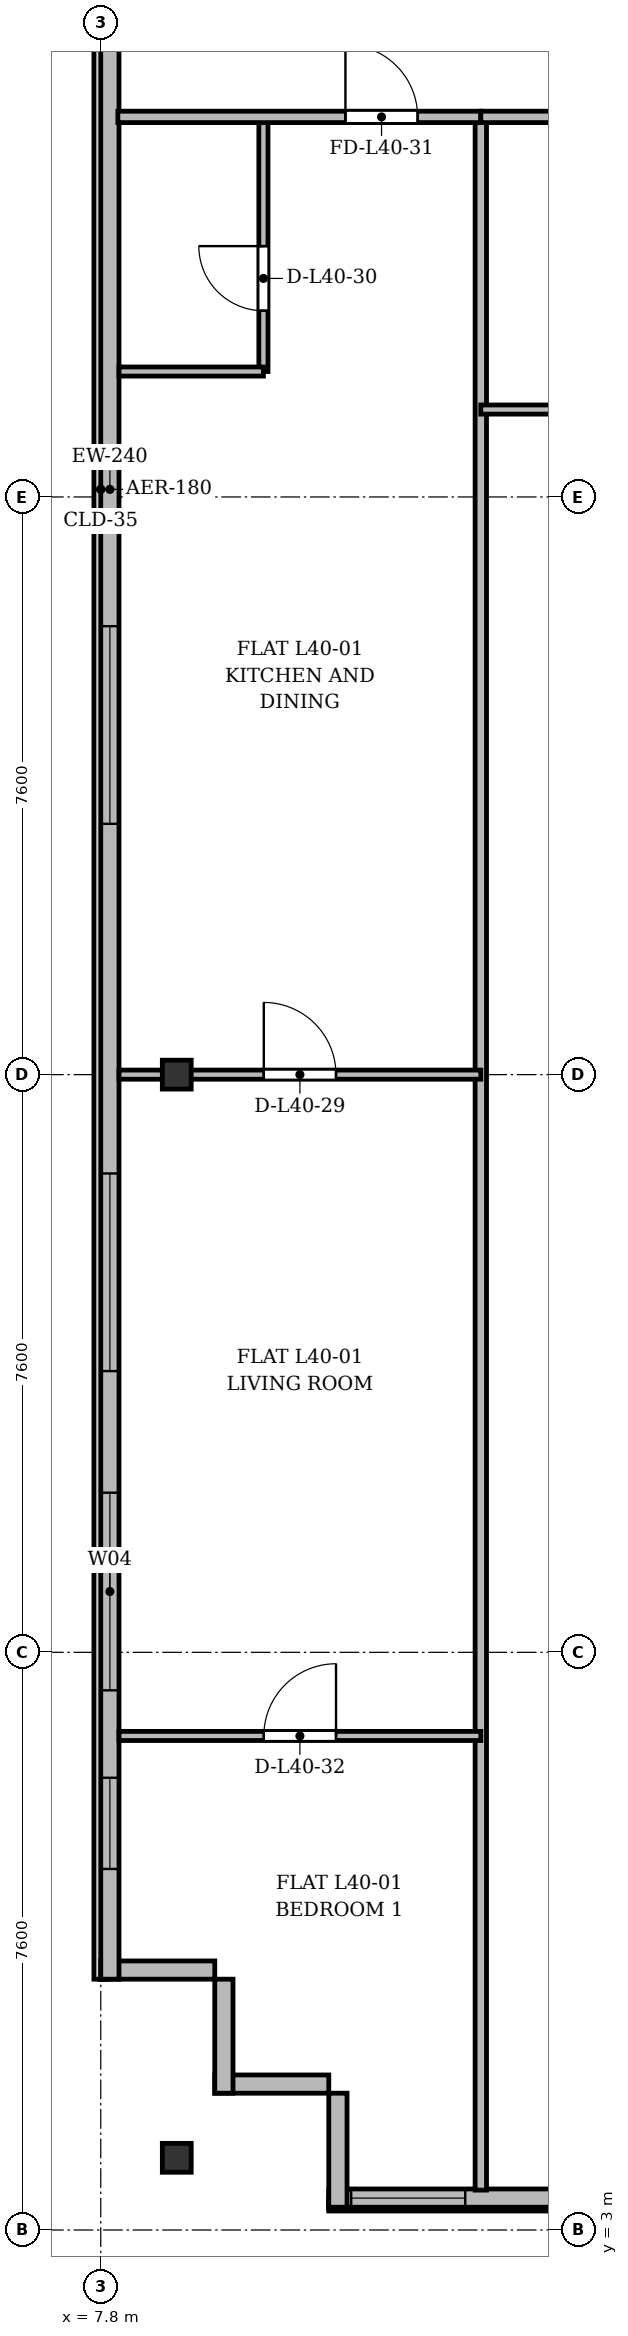
"""IFC4 building model, lengths in metres.
Left out: names, types, materials, properties, quantities, classifications, styles, units other than length and angle.
Written with IfcOpenShell. Run it as: python <this file> out.ifc"""

import sys

from ifc_helpers import new_model, si_unit, direction, frame, frame_2d, origin, origin_2d, place, context, subcontext, project, spatial, rectangle, i_section, extrude, source, transform, mapped, element, fill, save


model = new_model("IFC4")
c1 = context("Model", 3, precision=1e-05, world=origin(), true_north=direction((0.0, 1.0)))
c2 = subcontext(c1, "Body", "Model", "MODEL_VIEW")
j1 = project(units=[si_unit("LENGTHUNIT", "METRE"), si_unit("PLANEANGLEUNIT", "RADIAN")], contexts=[c1])
p1 = place(None, origin())
s1 = spatial("IfcSite", under=j1, at=p1, CompositionType="ELEMENT")
p2 = place(p1, origin())
s2 = spatial("IfcBuilding", under=s1, at=p2, CompositionType="ELEMENT")
p3 = place(p2, frame((0.0, 0.0, 153.7)))
s3 = spatial("IfcBuildingStorey", under=s2, at=p3, CompositionType="ELEMENT", Elevation=153.7)
m1 = source(origin(), c2, "Body", "SweptSolid", [
    extrude(i_section(OverallWidth=0.38, OverallDepth=0.38, WebThickness=0.02, FlangeThickness=0.03, at=origin_2d()), origin(), (0.0, 0.0, 1.0), 3.6),
])
for number, where, z_axis, x_axis in (
    (1, (8.8, 3.95, 0.0), (0.0, 0.0, 1.0), (1.0, 0.0, 0.0)),
    (2, (8.8, 18.2, 0.0), (0.0, 0.0, 1.0), (1.0, 0.0, 0.0)),
):
    element("IfcColumn", number, at=place(p3, frame(where, z_axis=z_axis, x_axis=x_axis)), inside=s3, PredefinedType="COLUMN", context=c2, shape_type="MappedRepresentation", body=[
        mapped(m1, transform((0.0, 0.0, 0.0), x_axis=(1.0, 0.0, 0.0), y_axis=(0.0, 1.0, 0.0), z_axis=(0.0, 0.0, 1.0), scale=1.0)),
    ])
for number, where, z_axis, x_axis in (
    (3, (10.8, 4.92, 0.0), (0.0, 0.0, 1.0), (-1.0, 0.0, 0.0)),
    (4, (9.42, 4.8, 0.0), (0.0, 0.0, 1.0), (0.0, 1.0, 0.0)),
):
    element("IfcWall", number, at=place(p3, frame(where, z_axis=z_axis, x_axis=x_axis)), inside=s3, PredefinedType="SOLIDWALL", context=c2, shape_type="SweptSolid", body=[
        extrude(rectangle(XDim=1.5, YDim=0.24, at=frame_2d((0.75, 0.0))), origin(), (0.0, 0.0, 1.0), 3.35),
    ])
p4 = place(p3, frame((9.3, 6.42, 0.0), z_axis=(0.0, 0.0, 1.0), x_axis=(-1.0, 0.0, 0.0)))
e5 = element("IfcWall", 5, at=p4, inside=s3, PredefinedType="SOLIDWALL", context=c2, shape_type="SweptSolid", body=[
    extrude(rectangle(XDim=1.5, YDim=0.24, at=frame_2d((0.75, 0.0))), origin(), (0.0, 0.0, 1.0), 2.85),
])
p5 = place(p3, frame((7.92, 6.3, 0.0), z_axis=(0.0, 0.0, 1.0), x_axis=(0.0, 1.0, 0.0)))
e6 = element("IfcWall", 6, at=p5, inside=s3, PredefinedType="SOLIDWALL", context=c2, shape_type="SweptSolid", body=[
    extrude(rectangle(XDim=39.2, YDim=0.24, at=frame_2d((19.6, 0.0))), origin(), (0.0, 0.0, 1.0), 3.35),
])
p6 = place(p5, frame((1.45, 0.0, 0.92)))
e7 = element("IfcOpeningElement", 7, at=p6, cuts=e6, PredefinedType="OPENING", context=c2, shape_type="SweptSolid", body=[
    extrude(rectangle(XDim=1.2, YDim=1.65, at=frame_2d((0.6, 0.825))), frame((0.0, 0.13, 0.0), z_axis=(0.0, -1.0, 0.0), x_axis=(1.0, 0.0, 0.0)), (0.0, 0.0, 1.0), 0.26),
])
p7 = place(p5, frame((3.8, 0.0, 0.92)))
e8 = element("IfcOpeningElement", 8, at=p7, cuts=e6, PredefinedType="OPENING", context=c2, shape_type="SweptSolid", body=[
    extrude(rectangle(XDim=2.6, YDim=1.9, at=frame_2d((1.3, 0.95))), frame((0.0, 0.13, 0.0), z_axis=(0.0, -1.0, 0.0), x_axis=(1.0, 0.0, 0.0)), (0.0, 0.0, 1.0), 0.26),
])
p8 = place(p5, frame((8.0, 0.0, 0.92)))
e9 = element("IfcOpeningElement", 9, at=p8, cuts=e6, PredefinedType="OPENING", context=c2, shape_type="SweptSolid", body=[
    extrude(rectangle(XDim=2.6, YDim=1.9, at=frame_2d((1.3, 0.95))), frame((0.0, 0.13, 0.0), z_axis=(0.0, -1.0, 0.0), x_axis=(1.0, 0.0, 0.0)), (0.0, 0.0, 1.0), 0.26),
])
p9 = place(p5, frame((15.2, 0.0, 0.92)))
e10 = element("IfcOpeningElement", 10, at=p9, cuts=e6, PredefinedType="OPENING", context=c2, shape_type="SweptSolid", body=[
    extrude(rectangle(XDim=2.6, YDim=1.9, at=frame_2d((1.3, 0.95))), frame((0.0, 0.13, 0.0), z_axis=(0.0, -1.0, 0.0), x_axis=(1.0, 0.0, 0.0)), (0.0, 0.0, 1.0), 0.26),
])
p10 = place(p5, frame((29.2, 0.0, 0.92)))
e11 = element("IfcOpeningElement", 11, at=p10, cuts=e6, PredefinedType="OPENING", context=c2, shape_type="SweptSolid", body=[
    extrude(rectangle(XDim=2.6, YDim=1.9, at=frame_2d((1.3, 0.95))), frame((0.0, 0.13, 0.0), z_axis=(0.0, -1.0, 0.0), x_axis=(1.0, 0.0, 0.0)), (0.0, 0.0, 1.0), 0.26),
])
p11 = place(p5, frame((33.5, 0.0, 0.92)))
e12 = element("IfcOpeningElement", 12, at=p11, cuts=e6, PredefinedType="OPENING", context=c2, shape_type="SweptSolid", body=[
    extrude(rectangle(XDim=1.2, YDim=1.65, at=frame_2d((0.6, 0.825))), frame((0.0, 0.13, 0.0), z_axis=(0.0, -1.0, 0.0), x_axis=(1.0, 0.0, 0.0)), (0.0, 0.0, 1.0), 0.26),
])
p12 = place(p5, frame((36.85, 0.0, 0.92)))
e13 = element("IfcOpeningElement", 13, at=p12, cuts=e6, PredefinedType="OPENING", context=c2, shape_type="SweptSolid", body=[
    extrude(rectangle(XDim=1.2, YDim=1.65, at=frame_2d((0.6, 0.825))), frame((0.0, 0.13, 0.0), z_axis=(0.0, -1.0, 0.0), x_axis=(1.0, 0.0, 0.0)), (0.0, 0.0, 1.0), 0.26),
])
p13 = place(p3, frame((63.6, 3.42, 0.0), z_axis=(0.0, 0.0, 1.0), x_axis=(-1.0, 0.0, 0.0)))
e14 = element("IfcWall", 14, at=p13, inside=s3, PredefinedType="SOLIDWALL", context=c2, shape_type="SweptSolid", body=[
    extrude(rectangle(XDim=52.8, YDim=0.24, at=frame_2d((26.4, 0.0))), origin(), (0.0, 0.0, 1.0), 3.35),
])
p14 = place(p13, frame((0.295, 0.0, 0.9)))
e15 = element("IfcOpeningElement", 15, at=p14, cuts=e14, PredefinedType="OPENING", context=c2, shape_type="SweptSolid", body=[
    extrude(rectangle(XDim=1.5, YDim=1.75, at=frame_2d((0.75, 0.875))), frame((0.0, 0.13, 0.0), z_axis=(0.0, -1.0, 0.0), x_axis=(1.0, 0.0, 0.0)), (0.0, 0.0, 1.0), 0.26),
])
p15 = place(p13, frame((3.6, 0.0, 0.9)))
e16 = element("IfcOpeningElement", 16, at=p15, cuts=e14, PredefinedType="OPENING", context=c2, shape_type="SweptSolid", body=[
    extrude(rectangle(XDim=2.2, YDim=1.8, at=frame_2d((1.1, 0.9))), frame((0.0, 0.13, 0.0), z_axis=(0.0, -1.0, 0.0), x_axis=(1.0, 0.0, 0.0)), (0.0, 0.0, 1.0), 0.26),
])
p16 = place(p13, frame((7.635, 0.0, 0.0)))
e17 = element("IfcOpeningElement", 17, at=p16, cuts=e14, PredefinedType="OPENING", context=c2, shape_type="SweptSolid", body=[
    extrude(rectangle(XDim=1.2, YDim=2.2, at=frame_2d((0.6, 1.1))), frame((0.0, 0.13, 0.0), z_axis=(0.0, -1.0, 0.0), x_axis=(1.0, 0.0, 0.0)), (0.0, 0.0, 1.0), 0.26),
])
p17 = place(p13, frame((9.6, 0.0, 0.9)))
e18 = element("IfcOpeningElement", 18, at=p17, cuts=e14, PredefinedType="OPENING", context=c2, shape_type="SweptSolid", body=[
    extrude(rectangle(XDim=2.0, YDim=1.95, at=frame_2d((1.0, 0.975))), frame((0.0, 0.13, 0.0), z_axis=(0.0, -1.0, 0.0), x_axis=(1.0, 0.0, 0.0)), (0.0, 0.0, 1.0), 0.26),
])
p18 = place(p13, frame((12.175, 0.0, 0.9)))
e19 = element("IfcOpeningElement", 19, at=p18, cuts=e14, PredefinedType="OPENING", context=c2, shape_type="SweptSolid", body=[
    extrude(rectangle(XDim=1.65, YDim=1.85, at=frame_2d((0.825, 0.925))), frame((0.0, 0.13, 0.0), z_axis=(0.0, -1.0, 0.0), x_axis=(1.0, 0.0, 0.0)), (0.0, 0.0, 1.0), 0.26),
])
p19 = place(p13, frame((16.1, 0.0, 0.9)))
e20 = element("IfcOpeningElement", 20, at=p19, cuts=e14, PredefinedType="OPENING", context=c2, shape_type="SweptSolid", body=[
    extrude(rectangle(XDim=1.8, YDim=1.8, at=frame_2d((0.9, 0.9))), frame((0.0, 0.13, 0.0), z_axis=(0.0, -1.0, 0.0), x_axis=(1.0, 0.0, 0.0)), (0.0, 0.0, 1.0), 0.26),
])
p20 = place(p13, frame((22.3, 0.0, 0.9)))
e21 = element("IfcOpeningElement", 21, at=p20, cuts=e14, PredefinedType="OPENING", context=c2, shape_type="SweptSolid", body=[
    extrude(rectangle(XDim=2.2, YDim=1.8, at=frame_2d((1.1, 0.9))), frame((0.0, 0.13, 0.0), z_axis=(0.0, -1.0, 0.0), x_axis=(1.0, 0.0, 0.0)), (0.0, 0.0, 1.0), 0.26),
])
p21 = place(p13, frame((27.75, 0.0, 0.9)))
e22 = element("IfcOpeningElement", 22, at=p21, cuts=e14, PredefinedType="OPENING", context=c2, shape_type="SweptSolid", body=[
    extrude(rectangle(XDim=1.5, YDim=1.75, at=frame_2d((0.75, 0.875))), frame((0.0, 0.13, 0.0), z_axis=(0.0, -1.0, 0.0), x_axis=(1.0, 0.0, 0.0)), (0.0, 0.0, 1.0), 0.26),
])
p22 = place(p13, frame((30.5, 0.0, 0.9)))
e23 = element("IfcOpeningElement", 23, at=p22, cuts=e14, PredefinedType="OPENING", context=c2, shape_type="SweptSolid", body=[
    extrude(rectangle(XDim=2.0, YDim=1.95, at=frame_2d((1.0, 0.975))), frame((0.0, 0.13, 0.0), z_axis=(0.0, -1.0, 0.0), x_axis=(1.0, 0.0, 0.0)), (0.0, 0.0, 1.0), 0.26),
])
p23 = place(p13, frame((34.375, 0.0, 0.9)))
e24 = element("IfcOpeningElement", 24, at=p23, cuts=e14, PredefinedType="OPENING", context=c2, shape_type="SweptSolid", body=[
    extrude(rectangle(XDim=1.65, YDim=1.85, at=frame_2d((0.825, 0.925))), frame((0.0, 0.13, 0.0), z_axis=(0.0, -1.0, 0.0), x_axis=(1.0, 0.0, 0.0)), (0.0, 0.0, 1.0), 0.26),
])
p24 = place(p13, frame((39.5, 0.0, 0.9)))
e25 = element("IfcOpeningElement", 25, at=p24, cuts=e14, PredefinedType="OPENING", context=c2, shape_type="SweptSolid", body=[
    extrude(rectangle(XDim=1.8, YDim=1.8, at=frame_2d((0.9, 0.9))), frame((0.0, 0.13, 0.0), z_axis=(0.0, -1.0, 0.0), x_axis=(1.0, 0.0, 0.0)), (0.0, 0.0, 1.0), 0.26),
])
p25 = place(p13, frame((43.65, 0.0, 0.9)))
e26 = element("IfcOpeningElement", 26, at=p25, cuts=e14, PredefinedType="OPENING", context=c2, shape_type="SweptSolid", body=[
    extrude(rectangle(XDim=1.5, YDim=1.75, at=frame_2d((0.75, 0.875))), frame((0.0, 0.13, 0.0), z_axis=(0.0, -1.0, 0.0), x_axis=(1.0, 0.0, 0.0)), (0.0, 0.0, 1.0), 0.26),
])
p26 = place(p13, frame((47.35, 0.0, 0.9)))
e27 = element("IfcOpeningElement", 27, at=p26, cuts=e14, PredefinedType="OPENING", context=c2, shape_type="SweptSolid", body=[
    extrude(rectangle(XDim=1.5, YDim=1.75, at=frame_2d((0.75, 0.875))), frame((0.0, 0.13, 0.0), z_axis=(0.0, -1.0, 0.0), x_axis=(1.0, 0.0, 0.0)), (0.0, 0.0, 1.0), 0.26),
])
p27 = place(p13, frame((51.005, 0.0, 0.9)))
e28 = element("IfcOpeningElement", 28, at=p27, cuts=e14, PredefinedType="OPENING", context=c2, shape_type="SweptSolid", body=[
    extrude(rectangle(XDim=1.5, YDim=1.75, at=frame_2d((0.75, 0.875))), frame((0.0, 0.13, 0.0), z_axis=(0.0, -1.0, 0.0), x_axis=(1.0, 0.0, 0.0)), (0.0, 0.0, 1.0), 0.26),
])
p28 = place(p13, frame((37.85, 0.0, 0.0)))
e29 = element("IfcOpeningElement", 29, at=p28, cuts=e14, PredefinedType="OPENING", context=c2, shape_type="SweptSolid", body=[
    extrude(rectangle(XDim=1.2, YDim=2.2, at=frame_2d((0.6, 1.1))), frame((0.0, 0.13, 0.0), z_axis=(0.0, -1.0, 0.0), x_axis=(1.0, 0.0, 0.0)), (0.0, 0.0, 1.0), 0.26),
])
p29 = place(p3, frame((10.92, 3.3, 0.0), z_axis=(0.0, 0.0, 1.0), x_axis=(0.0, 1.0, 0.0)))
e30 = element("IfcWall", 30, at=p29, inside=s3, PredefinedType="SOLIDWALL", context=c2, shape_type="SweptSolid", body=[
    extrude(rectangle(XDim=1.5, YDim=0.24, at=frame_2d((0.75, 0.0))), origin(), (0.0, 0.0, 1.0), 2.75),
])
p30 = place(p3, frame((12.8, 3.525, 0.0), z_axis=(0.0, 0.0, 1.0), x_axis=(0.0, 1.0, 0.0)))
e31 = element("IfcWall", 31, at=p30, inside=s3, PredefinedType="PARTITIONING", context=c2, shape_type="SweptSolid", body=[
    extrude(rectangle(XDim=27.275, YDim=0.15, at=frame_2d((13.638, 0.0))), origin(), (0.0, 0.0, 1.0), 2.75),
])
p31 = place(p3, frame((8.04, 18.2, 0.0), z_axis=(0.0, 0.0, 1.0), x_axis=(1.0, 0.0, 0.0)))
e32 = element("IfcWall", 32, at=p31, inside=s3, PredefinedType="PARTITIONING", context=c2, shape_type="SweptSolid", body=[
    extrude(rectangle(XDim=4.76, YDim=0.12, at=frame_2d((2.38, 0.0))), origin(), (0.0, 0.0, 1.0), 2.75),
])
p32 = place(p31, frame((1.905, 0.0, 0.0)))
e33 = element("IfcOpeningElement", 33, at=p32, cuts=e32, PredefinedType="OPENING", context=c2, shape_type="SweptSolid", body=[
    extrude(rectangle(XDim=0.95, YDim=2.15, at=frame_2d((0.475, 1.075))), frame((0.0, 0.07, 0.0), z_axis=(0.0, -1.0, 0.0), x_axis=(1.0, 0.0, 0.0)), (0.0, 0.0, 1.0), 0.14),
])
p33 = place(p3, frame((9.94, 27.45, 0.0), z_axis=(0.0, 0.0, 1.0), x_axis=(0.0, 1.0, 0.0)))
e34 = element("IfcWall", 34, at=p33, inside=s3, PredefinedType="PARTITIONING", context=c2, shape_type="SweptSolid", body=[
    extrude(rectangle(XDim=3.35, YDim=0.12, at=frame_2d((1.675, 0.0))), origin(), (0.0, 0.0, 1.0), 3.35),
])
p34 = place(p33, frame((0.8, 0.0, 0.0)))
e35 = element("IfcOpeningElement", 35, at=p34, cuts=e34, PredefinedType="OPENING", context=c2, shape_type="SweptSolid", body=[
    extrude(rectangle(XDim=0.85, YDim=2.1, at=frame_2d((0.425, 1.05))), frame((0.0, 0.07, 0.0), z_axis=(0.0, -1.0, 0.0), x_axis=(1.0, 0.0, 0.0)), (0.0, 0.0, 1.0), 0.14),
])
p35 = place(p3, frame((8.04, 27.45, 0.0), z_axis=(0.0, 0.0, 1.0), x_axis=(1.0, 0.0, 0.0)))
e36 = element("IfcWall", 36, at=p35, inside=s3, PredefinedType="PARTITIONING", context=c2, shape_type="SweptSolid", body=[
    extrude(rectangle(XDim=1.9, YDim=0.12, at=frame_2d((0.95, 0.0))), origin(), (0.0, 0.0, 1.0), 2.85),
])
p36 = place(p3, frame((8.025, 30.8, 0.0), z_axis=(0.0, 0.0, 1.0), x_axis=(1.0, 0.0, 0.0)))
e37 = element("IfcWall", 37, at=p36, inside=s3, PredefinedType="PARTITIONING", context=c2, shape_type="SweptSolid", body=[
    extrude(rectangle(XDim=4.775, YDim=0.15, at=frame_2d((2.388, 0.0))), origin(), (0.0, 0.0, 1.0), 2.85),
])
p37 = place(p36, frame((2.994, 0.0, 0.0)))
e38 = element("IfcOpeningElement", 38, at=p37, cuts=e37, PredefinedType="OPENING", context=c2, shape_type="SweptSolid", body=[
    extrude(rectangle(XDim=0.95, YDim=2.15, at=frame_2d((0.475, 1.075))), frame((0.0, 0.085, 0.0), z_axis=(0.0, -1.0, 0.0), x_axis=(1.0, 0.0, 0.0)), (0.0, 0.0, 1.0), 0.17),
])
p38 = place(p3, frame((8.04, 9.5, 0.0), z_axis=(0.0, 0.0, 1.0), x_axis=(1.0, 0.0, 0.0)))
e39 = element("IfcWall", 39, at=p38, inside=s3, PredefinedType="PARTITIONING", context=c2, shape_type="SweptSolid", body=[
    extrude(rectangle(XDim=4.76, YDim=0.12, at=frame_2d((2.38, 0.0))), origin(), (0.0, 0.0, 1.0), 2.85),
])
p39 = place(p38, frame((1.905, 0.0, 0.0)))
e40 = element("IfcOpeningElement", 40, at=p39, cuts=e39, PredefinedType="OPENING", context=c2, shape_type="SweptSolid", body=[
    extrude(rectangle(XDim=0.95, YDim=2.15, at=frame_2d((0.475, 1.075))), frame((0.0, 0.07, 0.0), z_axis=(0.0, -1.0, 0.0), x_axis=(1.0, 0.0, 0.0)), (0.0, 0.0, 1.0), 0.14),
])
p40 = place(p3, frame((12.8, 30.8, 0.0), z_axis=(0.0, 0.0, 1.0), x_axis=(1.0, 0.0, 0.0)))
e41 = element("IfcWall", 41, at=p40, inside=s3, PredefinedType="PARTITIONING", context=c2, shape_type="SweptSolid", body=[
    extrude(rectangle(XDim=5.4, YDim=0.15, at=frame_2d((2.7, 0.0))), origin(), (0.0, 0.0, 1.0), 2.85),
])
p41 = place(p40, frame((2.225, 0.0, 0.0)))
e42 = element("IfcOpeningElement", 42, at=p41, cuts=e41, PredefinedType="OPENING", context=c2, shape_type="SweptSolid", body=[
    extrude(rectangle(XDim=0.95, YDim=2.15, at=frame_2d((0.475, 1.075))), frame((0.0, 0.085, 0.0), z_axis=(0.0, -1.0, 0.0), x_axis=(1.0, 0.0, 0.0)), (0.0, 0.0, 1.0), 0.17),
])
p42 = place(p3, frame((12.8, 26.95, 0.0), z_axis=(0.0, 0.0, 1.0), x_axis=(1.0, 0.0, 0.0)))
e43 = element("IfcWall", 43, at=p42, inside=s3, PredefinedType="PARTITIONING", context=c2, shape_type="SweptSolid", body=[
    extrude(rectangle(XDim=5.4, YDim=0.12, at=frame_2d((2.7, 0.0))), origin(), (0.0, 0.0, 1.0), 2.85),
])
p43 = place(p42, frame((2.225, 0.0, 0.0)))
e44 = element("IfcOpeningElement", 44, at=p43, cuts=e43, PredefinedType="OPENING", context=c2, shape_type="SweptSolid", body=[
    extrude(rectangle(XDim=0.95, YDim=2.15, at=frame_2d((0.475, 1.075))), frame((0.0, 0.07, 0.0), z_axis=(0.0, -1.0, 0.0), x_axis=(1.0, 0.0, 0.0)), (0.0, 0.0, 1.0), 0.14),
])
m2 = source(origin(), c2, "Body", "SweptSolid", [
    extrude(rectangle(XDim=1.2, YDim=1.65, at=frame_2d((0.6, 0.825))), frame((0.0, 0.03, 0.0), z_axis=(0.0, -1.0, 0.0), x_axis=(1.0, 0.0, 0.0)), (0.0, 0.0, 1.0), 0.06),
])
p44 = place(p6, origin())
e45 = element("IfcWindow", 45, at=p44, inside=s3, PartitioningType="SINGLE_PANEL", PredefinedType="WINDOW", context=c2, shape_type="MappedRepresentation", body=[
    mapped(m2, transform((0.0, 0.0, 0.0), x_axis=(1.0, 0.0, 0.0), y_axis=(0.0, 1.0, 0.0), z_axis=(0.0, 0.0, 1.0), scale=1.0)),
])
fill(e7, e45)
m3 = source(origin(), c2, "Body", "SweptSolid", [
    extrude(rectangle(XDim=2.6, YDim=1.9, at=frame_2d((1.3, 0.95))), frame((0.0, 0.03, 0.0), z_axis=(0.0, -1.0, 0.0), x_axis=(1.0, 0.0, 0.0)), (0.0, 0.0, 1.0), 0.06),
])
p45 = place(p7, origin())
e46 = element("IfcWindow", 46, at=p45, inside=s3, PartitioningType="SINGLE_PANEL", PredefinedType="WINDOW", context=c2, shape_type="MappedRepresentation", body=[
    mapped(m3, transform((0.0, 0.0, 0.0), x_axis=(1.0, 0.0, 0.0), y_axis=(0.0, 1.0, 0.0), z_axis=(0.0, 0.0, 1.0), scale=1.0)),
])
fill(e8, e46)
p46 = place(p8, origin())
e47 = element("IfcWindow", 47, at=p46, inside=s3, PartitioningType="SINGLE_PANEL", PredefinedType="WINDOW", context=c2, shape_type="MappedRepresentation", body=[
    mapped(m3, transform((0.0, 0.0, 0.0), x_axis=(1.0, 0.0, 0.0), y_axis=(0.0, 1.0, 0.0), z_axis=(0.0, 0.0, 1.0), scale=1.0)),
])
fill(e9, e47)
p47 = place(p9, origin())
e48 = element("IfcWindow", 48, at=p47, inside=s3, PartitioningType="SINGLE_PANEL", PredefinedType="WINDOW", context=c2, shape_type="MappedRepresentation", body=[
    mapped(m3, transform((0.0, 0.0, 0.0), x_axis=(1.0, 0.0, 0.0), y_axis=(0.0, 1.0, 0.0), z_axis=(0.0, 0.0, 1.0), scale=1.0)),
])
fill(e10, e48)
m4 = source(origin(), c2, "Body", "SweptSolid", [
    extrude(rectangle(XDim=1.5, YDim=1.75, at=frame_2d((0.75, 0.875))), frame((0.0, 0.03, 0.0), z_axis=(0.0, -1.0, 0.0), x_axis=(1.0, 0.0, 0.0)), (0.0, 0.0, 1.0), 0.06),
])
p48 = place(p27, origin())
e49 = element("IfcWindow", 49, at=p48, inside=s3, PartitioningType="SINGLE_PANEL", PredefinedType="WINDOW", context=c2, shape_type="MappedRepresentation", body=[
    mapped(m4, transform((0.0, 0.0, 0.0), x_axis=(1.0, 0.0, 0.0), y_axis=(0.0, 1.0, 0.0), z_axis=(0.0, 0.0, 1.0), scale=1.0)),
])
fill(e28, e49)
m5 = source(origin(), c2, "Body", "SweptSolid", [
    extrude(rectangle(XDim=0.95, YDim=2.15, at=frame_2d((0.475, 1.075))), frame((0.0, 0.025, 0.0), z_axis=(0.0, -1.0, 0.0), x_axis=(1.0, 0.0, 0.0)), (0.0, 0.0, 1.0), 0.05),
])
p49 = place(p32, origin())
e50 = element("IfcDoor", 50, at=p49, inside=s3, OperationType="SINGLE_SWING_LEFT", PredefinedType="DOOR", context=c2, shape_type="MappedRepresentation", body=[
    mapped(m5, transform((0.0, 0.0, 0.0), x_axis=(1.0, 0.0, 0.0), y_axis=(0.0, 1.0, 0.0), z_axis=(0.0, 0.0, 1.0), scale=1.0)),
])
fill(e33, e50)
m6 = source(origin(), c2, "Body", "SweptSolid", [
    extrude(rectangle(XDim=0.85, YDim=2.1, at=frame_2d((0.425, 1.05))), frame((0.0, 0.025, 0.0), z_axis=(0.0, -1.0, 0.0), x_axis=(1.0, 0.0, 0.0)), (0.0, 0.0, 1.0), 0.05),
])
p50 = place(p34, origin())
e51 = element("IfcDoor", 51, at=p50, inside=s3, OperationType="SINGLE_SWING_RIGHT", PredefinedType="DOOR", context=c2, shape_type="MappedRepresentation", body=[
    mapped(m6, transform((0.0, 0.0, 0.0), x_axis=(1.0, 0.0, 0.0), y_axis=(0.0, 1.0, 0.0), z_axis=(0.0, 0.0, 1.0), scale=1.0)),
])
fill(e35, e51)
p51 = place(p37, origin())
e52 = element("IfcDoor", 52, at=p51, inside=s3, OperationType="SINGLE_SWING_LEFT", PredefinedType="DOOR", context=c2, shape_type="MappedRepresentation", body=[
    mapped(m5, transform((0.0, 0.0, 0.0), x_axis=(1.0, 0.0, 0.0), y_axis=(0.0, 1.0, 0.0), z_axis=(0.0, 0.0, 1.0), scale=1.0)),
])
fill(e38, e52)
p52 = place(p39, origin())
e53 = element("IfcDoor", 53, at=p52, inside=s3, OperationType="SINGLE_SWING_RIGHT", PredefinedType="DOOR", context=c2, shape_type="MappedRepresentation", body=[
    mapped(m5, transform((0.0, 0.0, 0.0), x_axis=(1.0, 0.0, 0.0), y_axis=(0.0, 1.0, 0.0), z_axis=(0.0, 0.0, 1.0), scale=1.0)),
])
fill(e40, e53)
save(model, sys.argv[1])
